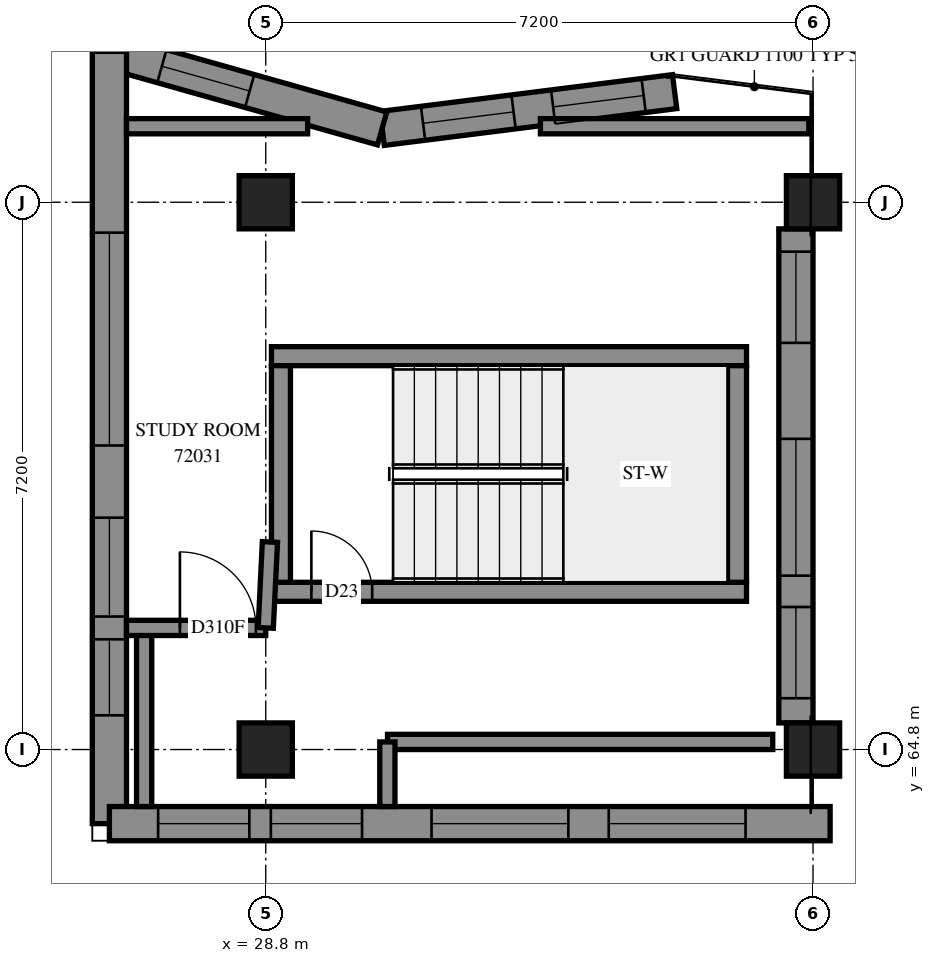
"""IFC4 building model, lengths in metres.
Left out: names, types, materials, properties, quantities, classifications, styles, units other than length and angle.
Written with IfcOpenShell. Run it as: python <this file> out.ifc"""

import sys

from ifc_helpers import new_model, si_unit, direction, frame, frame_2d, origin, origin_2d, place, context, subcontext, project, spatial, polyline, rectangle, outline, extrude, element, fill, save


model = new_model("IFC4")
c1 = context("Model", 3, precision=1e-05, world=origin(), true_north=direction((0.0, 1.0)))
c2 = subcontext(c1, "Body", "Model", "MODEL_VIEW")
j1 = project(units=[si_unit("LENGTHUNIT", "METRE"), si_unit("PLANEANGLEUNIT", "RADIAN")], contexts=[c1])
p1 = place(None, origin())
s1 = spatial("IfcSite", under=j1, at=p1, CompositionType="ELEMENT")
p2 = place(p1, origin())
s2 = spatial("IfcBuilding", under=s1, at=p2, CompositionType="ELEMENT")
p3 = place(p2, frame((0.0, 0.0, 264.2)))
s3 = spatial("IfcBuildingStorey", under=s2, at=p3, CompositionType="ELEMENT", Elevation=264.2)
for number, where, z_axis, x_axis in (
    (1, (28.8, 64.8, 0.0), (0.0, 0.0, 1.0), (1.0, 0.0, 0.0)),
    (2, (28.8, 72.0, 0.0), (0.0, 0.0, 1.0), (1.0, 0.0, 0.0)),
    (3, (36.0, 64.8, 0.0), (0.0, 0.0, 1.0), (1.0, 0.0, 0.0)),
    (4, (36.0, 72.0, 0.0), (0.0, 0.0, 1.0), (1.0, 0.0, 0.0)),
):
    element("IfcColumn", number, at=place(p3, frame(where, z_axis=z_axis, x_axis=x_axis)), inside=s3, PredefinedType="COLUMN", context=c2, shape_type="SweptSolid", body=[
        extrude(rectangle(XDim=0.7, YDim=0.7, at=origin_2d()), origin(), (0.0, 0.0, 1.0), 3.1),
    ])
p4 = place(p3, frame((34.179, 73.455, 0.0), z_axis=(0.0, 0.0, 1.0), x_axis=(-0.9921779823, -0.1248312917, 0.0)))
e5 = element("IfcWall", 5, at=p4, inside=s3, PredefinedType="SOLIDWALL", context=c2, shape_type="SweptSolid", body=[
    extrude(outline(polyline([(-0.028, -0.225), (3.832, -0.225), (3.924, 0.225), (0.028, 0.225), (-0.028, -0.225)])), origin(), (0.0, 0.0, 1.0), 3.1),
])
p5 = place(p4, frame((0.411, 0.0, 0.45)))
e6 = element("IfcOpeningElement", 6, at=p5, cuts=e5, PredefinedType="OPENING", context=c2, shape_type="SweptSolid", body=[
    extrude(rectangle(XDim=1.2, YDim=2.55, at=frame_2d((0.6, 1.275))), frame((0.0, 0.235, 0.0), z_axis=(0.0, -1.0, 0.0), x_axis=(1.0, 0.0, 0.0)), (0.0, 0.0, 1.0), 0.47),
])
p6 = place(p4, frame((2.136, 0.0, 0.45)))
e7 = element("IfcOpeningElement", 7, at=p6, cuts=e5, PredefinedType="OPENING", context=c2, shape_type="SweptSolid", body=[
    extrude(rectangle(XDim=1.2, YDim=2.55, at=frame_2d((0.6, 1.275))), frame((0.0, 0.235, 0.0), z_axis=(0.0, -1.0, 0.0), x_axis=(1.0, 0.0, 0.0)), (0.0, 0.0, 1.0), 0.47),
])
p7 = place(p3, frame((30.331, 72.971, 0.0), z_axis=(0.0, 0.0, 1.0), x_axis=(-0.9623504365, 0.2718117681, 0.0)))
e8 = element("IfcWall", 8, at=p7, inside=s3, PredefinedType="SOLIDWALL", context=c2, shape_type="SweptSolid", body=[
    extrude(outline(polyline([(0.046, -0.225), (4.026, -0.225), (3.431, 0.225), (-0.046, 0.225), (0.046, -0.225)])), origin(), (0.0, 0.0, 1.0), 3.1),
])
p8 = place(p7, frame((1.811, 0.0, 0.45)))
e9 = element("IfcOpeningElement", 9, at=p8, cuts=e8, PredefinedType="OPENING", context=c2, shape_type="SweptSolid", body=[
    extrude(rectangle(XDim=1.2, YDim=2.55, at=frame_2d((0.6, 1.275))), frame((0.0, 0.235, 0.0), z_axis=(0.0, -1.0, 0.0), x_axis=(1.0, 0.0, 0.0)), (0.0, 0.0, 1.0), 0.47),
])
p9 = place(p3, frame((26.743, 73.985, 0.0), z_axis=(0.0, 0.0, 1.0), x_axis=(0.0, -1.0, 0.0)))
e10 = element("IfcWall", 10, at=p9, inside=s3, PredefinedType="SOLIDWALL", context=c2, shape_type="SweptSolid", body=[
    extrude(outline(polyline([(-0.297, -0.225), (10.385, -0.225), (9.935, 0.225), (0.297, 0.225), (-0.297, -0.225)])), origin(), (0.0, 0.0, 1.0), 3.1),
])
p10 = place(p9, frame((2.385, 0.0, 0.45)))
e11 = element("IfcOpeningElement", 11, at=p10, cuts=e10, PredefinedType="OPENING", context=c2, shape_type="SweptSolid", body=[
    extrude(rectangle(XDim=2.8, YDim=2.55, at=frame_2d((1.4, 1.275))), frame((0.0, 0.235, 0.0), z_axis=(0.0, -1.0, 0.0), x_axis=(1.0, 0.0, 0.0)), (0.0, 0.0, 1.0), 0.47),
])
p11 = place(p9, frame((6.135, 0.0, 0.45)))
e12 = element("IfcOpeningElement", 12, at=p11, cuts=e10, PredefinedType="OPENING", context=c2, shape_type="SweptSolid", body=[
    extrude(rectangle(XDim=1.3, YDim=2.5, at=frame_2d((0.65, 1.25))), frame((0.0, 0.235, 0.0), z_axis=(0.0, -1.0, 0.0), x_axis=(1.0, 0.0, 0.0)), (0.0, 0.0, 1.0), 0.47),
])
p12 = place(p9, frame((7.735, 0.0, 0.45)))
e13 = element("IfcOpeningElement", 13, at=p12, cuts=e10, PredefinedType="OPENING", context=c2, shape_type="SweptSolid", body=[
    extrude(rectangle(XDim=1.0, YDim=2.5, at=frame_2d((0.5, 1.25))), frame((0.0, 0.235, 0.0), z_axis=(0.0, -1.0, 0.0), x_axis=(1.0, 0.0, 0.0)), (0.0, 0.0, 1.0), 0.47),
])
p13 = place(p3, frame((26.743, 63.825, 0.0), z_axis=(0.0, 0.0, 1.0), x_axis=(1.0, 0.0, 0.0)))
e14 = element("IfcWall", 14, at=p13, inside=s3, PredefinedType="SOLIDWALL", context=c2, shape_type="SweptSolid", body=[
    extrude(outline(polyline([(-0.225, -0.225), (9.257, -0.225), (9.707, 0.225), (0.225, 0.225), (-0.225, -0.225)])), origin(), (0.0, 0.0, 1.0), 3.1),
])
p14 = place(p13, frame((6.569, 0.0, 0.6)))
e15 = element("IfcOpeningElement", 15, at=p14, cuts=e14, PredefinedType="OPENING", context=c2, shape_type="SweptSolid", body=[
    extrude(rectangle(XDim=1.8, YDim=1.9, at=frame_2d((0.9, 0.95))), frame((0.0, 0.235, 0.0), z_axis=(0.0, -1.0, 0.0), x_axis=(1.0, 0.0, 0.0)), (0.0, 0.0, 1.0), 0.47),
])
p15 = place(p13, frame((0.641, 0.0, 0.6)))
e16 = element("IfcOpeningElement", 16, at=p15, cuts=e14, PredefinedType="OPENING", context=c2, shape_type="SweptSolid", body=[
    extrude(rectangle(XDim=1.2, YDim=1.9, at=frame_2d((0.6, 0.95))), frame((0.0, 0.235, 0.0), z_axis=(0.0, -1.0, 0.0), x_axis=(1.0, 0.0, 0.0)), (0.0, 0.0, 1.0), 0.47),
])
p16 = place(p13, frame((2.124, 0.0, 0.6)))
e17 = element("IfcOpeningElement", 17, at=p16, cuts=e14, PredefinedType="OPENING", context=c2, shape_type="SweptSolid", body=[
    extrude(rectangle(XDim=1.2, YDim=1.9, at=frame_2d((0.6, 0.95))), frame((0.0, 0.235, 0.0), z_axis=(0.0, -1.0, 0.0), x_axis=(1.0, 0.0, 0.0)), (0.0, 0.0, 1.0), 0.47),
])
p17 = place(p13, frame((4.238, 0.0, 0.7)))
e18 = element("IfcOpeningElement", 18, at=p17, cuts=e14, PredefinedType="OPENING", context=c2, shape_type="SweptSolid", body=[
    extrude(rectangle(XDim=1.8, YDim=1.8, at=frame_2d((0.9, 0.9))), frame((0.0, 0.235, 0.0), z_axis=(0.0, -1.0, 0.0), x_axis=(1.0, 0.0, 0.0)), (0.0, 0.0, 1.0), 0.47),
])
p18 = place(p3, frame((35.775, 65.15, 0.0), z_axis=(0.0, 0.0, 1.0), x_axis=(0.0, 1.0, 0.0)))
e19 = element("IfcWall", 19, at=p18, inside=s3, PredefinedType="SOLIDWALL", context=c2, shape_type="SweptSolid", body=[
    extrude(rectangle(XDim=6.5, YDim=0.45, at=frame_2d((3.25, 0.0))), origin(), (0.0, 0.0, 1.0), 3.1),
])
p19 = place(p18, frame((0.325, 0.0, 0.6)))
e20 = element("IfcOpeningElement", 20, at=p19, cuts=e19, PredefinedType="OPENING", context=c2, shape_type="SweptSolid", body=[
    extrude(rectangle(XDim=1.2, YDim=1.9, at=frame_2d((0.6, 0.95))), frame((0.0, 0.235, 0.0), z_axis=(0.0, -1.0, 0.0), x_axis=(1.0, 0.0, 0.0)), (0.0, 0.0, 1.0), 0.47),
])
p20 = place(p18, frame((1.938, 0.0, 0.7)))
e21 = element("IfcOpeningElement", 21, at=p20, cuts=e19, PredefinedType="OPENING", context=c2, shape_type="SweptSolid", body=[
    extrude(rectangle(XDim=1.8, YDim=1.8, at=frame_2d((0.9, 0.9))), frame((0.0, 0.235, 0.0), z_axis=(0.0, -1.0, 0.0), x_axis=(1.0, 0.0, 0.0)), (0.0, 0.0, 1.0), 0.47),
])
p21 = place(p18, frame((5.0, 0.0, 0.6)))
e22 = element("IfcOpeningElement", 22, at=p21, cuts=e19, PredefinedType="OPENING", context=c2, shape_type="SweptSolid", body=[
    extrude(rectangle(XDim=1.2, YDim=1.9, at=frame_2d((0.6, 0.95))), frame((0.0, 0.235, 0.0), z_axis=(0.0, -1.0, 0.0), x_axis=(1.0, 0.0, 0.0)), (0.0, 0.0, 1.0), 0.47),
])
p22 = place(p3, frame((28.875, 66.875, -0.3), z_axis=(0.0, 0.0, 1.0), x_axis=(1.0, 0.0, 0.0)))
e23 = element("IfcWall", 23, at=p22, inside=s3, PredefinedType="SOLIDWALL", context=c2, shape_type="SweptSolid", body=[
    extrude(rectangle(XDim=6.25, YDim=0.25, at=frame_2d((3.125, 0.0))), origin(), (0.0, 0.0, 1.0), 3.4),
])
p23 = place(p22, frame((0.525, 0.0, 0.3)))
e24 = element("IfcOpeningElement", 24, at=p23, cuts=e23, PredefinedType="OPENING", context=c2, shape_type="SweptSolid", body=[
    extrude(rectangle(XDim=0.8, YDim=2.1, at=frame_2d((0.4, 1.05))), frame((0.0, 0.135, 0.0), z_axis=(0.0, -1.0, 0.0), x_axis=(1.0, 0.0, 0.0)), (0.0, 0.0, 1.0), 0.27),
])
p24 = place(p3, frame((28.875, 69.975, -0.3), z_axis=(0.0, 0.0, 1.0), x_axis=(1.0, 0.0, 0.0)))
e25 = element("IfcWall", 25, at=p24, inside=s3, PredefinedType="SOLIDWALL", context=c2, shape_type="SweptSolid", body=[
    extrude(rectangle(XDim=6.25, YDim=0.25, at=frame_2d((3.125, 0.0))), origin(), (0.0, 0.0, 1.0), 3.4),
])
for number, where, z_axis, x_axis in (
    (26, (29.0, 67.0, -0.3), (0.0, 0.0, 1.0), (0.0, 1.0, 0.0)),
    (27, (35.0, 67.0, -0.3), (0.0, 0.0, 1.0), (0.0, 1.0, 0.0)),
):
    element("IfcWall", number, at=place(p3, frame(where, z_axis=z_axis, x_axis=x_axis)), inside=s3, PredefinedType="SOLIDWALL", context=c2, shape_type="SweptSolid", body=[
        extrude(rectangle(XDim=2.85, YDim=0.25, at=frame_2d((1.425, 0.0))), origin(), (0.0, 0.0, 1.0), 3.4),
    ])
p25 = place(p3, frame((30.402, 64.9, 0.0), z_axis=(0.0, 0.0, 1.0), x_axis=(1.0, 0.0, 0.0)))
e28 = element("IfcWall", 28, at=p25, inside=s3, PredefinedType="PARTITIONING", context=c2, shape_type="SweptSolid", body=[
    extrude(rectangle(XDim=5.068, YDim=0.2, at=frame_2d((2.534, 0.0))), origin(), (0.0, 0.0, 1.0), 2.6),
])
p26 = place(p3, frame((32.413, 73.0, 0.0), z_axis=(0.0, 0.0, 1.0), x_axis=(1.0, 0.0, 0.0)))
e29 = element("IfcWall", 29, at=p26, inside=s3, PredefinedType="PARTITIONING", context=c2, shape_type="SweptSolid", body=[
    extrude(rectangle(XDim=3.531, YDim=0.2, at=frame_2d((1.766, 0.0))), origin(), (0.0, 0.0, 1.0), 3.1),
])
p27 = place(p3, frame((26.968, 73.0, 0.0), z_axis=(0.0, 0.0, 1.0), x_axis=(1.0, 0.0, 0.0)))
e30 = element("IfcWall", 30, at=p27, inside=s3, PredefinedType="PARTITIONING", context=c2, shape_type="SweptSolid", body=[
    extrude(rectangle(XDim=2.383, YDim=0.2, at=frame_2d((1.192, 0.0))), origin(), (0.0, 0.0, 1.0), 3.1),
])
p28 = place(p3, frame((27.2, 64.05, 0.0), z_axis=(0.0, 0.0, 1.0), x_axis=(0.0, 1.0, 0.0)))
e31 = element("IfcWall", 31, at=p28, inside=s3, PredefinedType="PARTITIONING", context=c2, shape_type="SweptSolid", body=[
    extrude(rectangle(XDim=2.348, YDim=0.2, at=frame_2d((1.174, 0.0))), origin(), (0.0, 0.0, 1.0), 3.1),
])
p29 = place(p3, frame((26.968, 66.4, 0.0), z_axis=(0.0, 0.0, 1.0), x_axis=(1.0, 0.0, 0.0)))
e32 = element("IfcWall", 32, at=p29, inside=s3, PredefinedType="PARTITIONING", context=c2, shape_type="SweptSolid", body=[
    extrude(rectangle(XDim=1.832, YDim=0.2, at=frame_2d((0.916, 0.0))), origin(), (0.0, 0.0, 1.0), 3.1),
])
p30 = place(p29, frame((0.703, 0.0, 0.0)))
e33 = element("IfcOpeningElement", 33, at=p30, cuts=e32, PredefinedType="OPENING", context=c2, shape_type="SweptSolid", body=[
    extrude(rectangle(XDim=1.0, YDim=2.1, at=frame_2d((0.5, 1.05))), frame((0.0, 0.11, 0.0), z_axis=(0.0, -1.0, 0.0), x_axis=(1.0, 0.0, 0.0)), (0.0, 0.0, 1.0), 0.22),
])
p31 = place(p3, frame((30.4, 64.05, 0.0), z_axis=(0.0, 0.0, 1.0), x_axis=(0.0, 1.0, 0.0)))
e34 = element("IfcWall", 34, at=p31, inside=s3, PredefinedType="PARTITIONING", context=c2, shape_type="SweptSolid", body=[
    extrude(rectangle(XDim=0.85, YDim=0.2, at=frame_2d((0.425, 0.0))), origin(), (0.0, 0.0, 1.0), 3.1),
])
p32 = place(p3, frame((28.855, 67.53, 0.0), z_axis=(0.0, 0.0, 1.0), x_axis=(-0.0486150155, -0.9988175911, 0.0)))
e35 = element("IfcWall", 35, at=p32, inside=s3, PredefinedType="PARTITIONING", context=c2, shape_type="SweptSolid", body=[
    extrude(rectangle(XDim=1.131, YDim=0.2, at=frame_2d((0.566, 0.0))), origin(), (0.0, 0.0, 1.0), 2.6),
])
p33 = place(p5, origin())
e36 = element("IfcWindow", 36, at=p33, inside=s3, PartitioningType="SINGLE_PANEL", PredefinedType="WINDOW", context=c2, shape_type="SweptSolid", body=[
    extrude(rectangle(XDim=1.2, YDim=2.55, at=frame_2d((0.6, 1.275))), frame((0.0, 0.125, 0.0), z_axis=(0.0, -1.0, 0.0), x_axis=(1.0, 0.0, 0.0)), (0.0, 0.0, 1.0), 0.06),
])
fill(e6, e36)
p34 = place(p6, origin())
e37 = element("IfcWindow", 37, at=p34, inside=s3, PartitioningType="SINGLE_PANEL", PredefinedType="WINDOW", context=c2, shape_type="SweptSolid", body=[
    extrude(rectangle(XDim=1.2, YDim=2.55, at=frame_2d((0.6, 1.275))), frame((0.0, 0.205, 0.0), z_axis=(0.0, -1.0, 0.0), x_axis=(1.0, 0.0, 0.0)), (0.0, 0.0, 1.0), 0.06),
])
fill(e7, e37)
p35 = place(p8, origin())
e38 = element("IfcWindow", 38, at=p35, inside=s3, PartitioningType="SINGLE_PANEL", PredefinedType="WINDOW", context=c2, shape_type="SweptSolid", body=[
    extrude(rectangle(XDim=1.2, YDim=2.55, at=frame_2d((0.6, 1.275))), frame((0.0, 0.205, 0.0), z_axis=(0.0, -1.0, 0.0), x_axis=(1.0, 0.0, 0.0)), (0.0, 0.0, 1.0), 0.06),
])
fill(e9, e38)
p36 = place(p10, origin())
e39 = element("IfcWindow", 39, at=p36, inside=s3, PartitioningType="SINGLE_PANEL", PredefinedType="WINDOW", context=c2, shape_type="SweptSolid", body=[
    extrude(rectangle(XDim=2.8, YDim=2.55, at=frame_2d((1.4, 1.275))), frame((0.0, 0.205, 0.0), z_axis=(0.0, -1.0, 0.0), x_axis=(1.0, 0.0, 0.0)), (0.0, 0.0, 1.0), 0.06),
])
fill(e11, e39)
p37 = place(p14, origin())
e40 = element("IfcWindow", 40, at=p37, inside=s3, PartitioningType="SINGLE_PANEL", PredefinedType="WINDOW", context=c2, shape_type="SweptSolid", body=[
    extrude(rectangle(XDim=1.8, YDim=1.9, at=frame_2d((0.9, 0.95))), frame((0.0, 0.205, 0.0), z_axis=(0.0, -1.0, 0.0), x_axis=(1.0, 0.0, 0.0)), (0.0, 0.0, 1.0), 0.06),
])
fill(e15, e40)
p38 = place(p15, origin())
e41 = element("IfcWindow", 41, at=p38, inside=s3, PartitioningType="SINGLE_PANEL", PredefinedType="WINDOW", context=c2, shape_type="SweptSolid", body=[
    extrude(rectangle(XDim=1.2, YDim=1.9, at=frame_2d((0.6, 0.95))), frame((0.0, 0.205, 0.0), z_axis=(0.0, -1.0, 0.0), x_axis=(1.0, 0.0, 0.0)), (0.0, 0.0, 1.0), 0.06),
])
fill(e16, e41)
p39 = place(p23, origin())
e42 = element("IfcDoor", 42, at=p39, inside=s3, OperationType="SINGLE_SWING_LEFT", PredefinedType="DOOR", context=c2, shape_type="SweptSolid", body=[
    extrude(rectangle(XDim=0.8, YDim=2.1, at=frame_2d((0.4, 1.05))), frame((0.0, 0.025, 0.0), z_axis=(0.0, -1.0, 0.0), x_axis=(1.0, 0.0, 0.0)), (0.0, 0.0, 1.0), 0.05),
])
fill(e24, e42)
p40 = place(p30, origin())
e43 = element("IfcDoor", 43, at=p40, inside=s3, OperationType="SINGLE_SWING_LEFT", PredefinedType="DOOR", context=c2, shape_type="SweptSolid", body=[
    extrude(rectangle(XDim=1.0, YDim=2.1, at=frame_2d((0.5, 1.05))), frame((0.0, 0.025, 0.0), z_axis=(0.0, -1.0, 0.0), x_axis=(1.0, 0.0, 0.0)), (0.0, 0.0, 1.0), 0.05),
])
fill(e33, e43)
p41 = place(p11, origin())
e44 = element("IfcWindow", 44, at=p41, inside=s3, PartitioningType="SINGLE_PANEL", PredefinedType="WINDOW", context=c2, shape_type="SweptSolid", body=[
    extrude(rectangle(XDim=1.3, YDim=2.5, at=frame_2d((0.65, 1.25))), frame((0.0, 0.205, 0.0), z_axis=(0.0, -1.0, 0.0), x_axis=(1.0, 0.0, 0.0)), (0.0, 0.0, 1.0), 0.06),
])
fill(e12, e44)
p42 = place(p12, origin())
e45 = element("IfcWindow", 45, at=p42, inside=s3, PartitioningType="SINGLE_PANEL", PredefinedType="WINDOW", context=c2, shape_type="SweptSolid", body=[
    extrude(rectangle(XDim=1.0, YDim=2.5, at=frame_2d((0.5, 1.25))), frame((0.0, 0.205, 0.0), z_axis=(0.0, -1.0, 0.0), x_axis=(1.0, 0.0, 0.0)), (0.0, 0.0, 1.0), 0.06),
])
fill(e13, e45)
p43 = place(p16, origin())
e46 = element("IfcWindow", 46, at=p43, inside=s3, PartitioningType="SINGLE_PANEL", PredefinedType="WINDOW", context=c2, shape_type="SweptSolid", body=[
    extrude(rectangle(XDim=1.2, YDim=1.9, at=frame_2d((0.6, 0.95))), frame((0.0, 0.205, 0.0), z_axis=(0.0, -1.0, 0.0), x_axis=(1.0, 0.0, 0.0)), (0.0, 0.0, 1.0), 0.06),
])
fill(e17, e46)
p44 = place(p17, origin())
e47 = element("IfcWindow", 47, at=p44, inside=s3, PartitioningType="SINGLE_PANEL", PredefinedType="WINDOW", context=c2, shape_type="SweptSolid", body=[
    extrude(rectangle(XDim=1.8, YDim=1.8, at=frame_2d((0.9, 0.9))), frame((0.0, 0.205, 0.0), z_axis=(0.0, -1.0, 0.0), x_axis=(1.0, 0.0, 0.0)), (0.0, 0.0, 1.0), 0.06),
])
fill(e18, e47)
p45 = place(p19, origin())
e48 = element("IfcWindow", 48, at=p45, inside=s3, PartitioningType="SINGLE_PANEL", PredefinedType="WINDOW", context=c2, shape_type="SweptSolid", body=[
    extrude(rectangle(XDim=1.2, YDim=1.9, at=frame_2d((0.6, 0.95))), frame((0.0, 0.205, 0.0), z_axis=(0.0, -1.0, 0.0), x_axis=(1.0, 0.0, 0.0)), (0.0, 0.0, 1.0), 0.06),
])
fill(e20, e48)
p46 = place(p20, origin())
e49 = element("IfcWindow", 49, at=p46, inside=s3, PartitioningType="SINGLE_PANEL", PredefinedType="WINDOW", context=c2, shape_type="SweptSolid", body=[
    extrude(rectangle(XDim=1.8, YDim=1.8, at=frame_2d((0.9, 0.9))), frame((0.0, 0.205, 0.0), z_axis=(0.0, -1.0, 0.0), x_axis=(1.0, 0.0, 0.0)), (0.0, 0.0, 1.0), 0.06),
])
fill(e21, e49)
p47 = place(p21, origin())
e50 = element("IfcWindow", 50, at=p47, inside=s3, PartitioningType="SINGLE_PANEL", PredefinedType="WINDOW", context=c2, shape_type="SweptSolid", body=[
    extrude(rectangle(XDim=1.2, YDim=1.9, at=frame_2d((0.6, 0.95))), frame((0.0, 0.205, 0.0), z_axis=(0.0, -1.0, 0.0), x_axis=(1.0, 0.0, 0.0)), (0.0, 0.0, 1.0), 0.06),
])
fill(e22, e50)
save(model, sys.argv[1])
